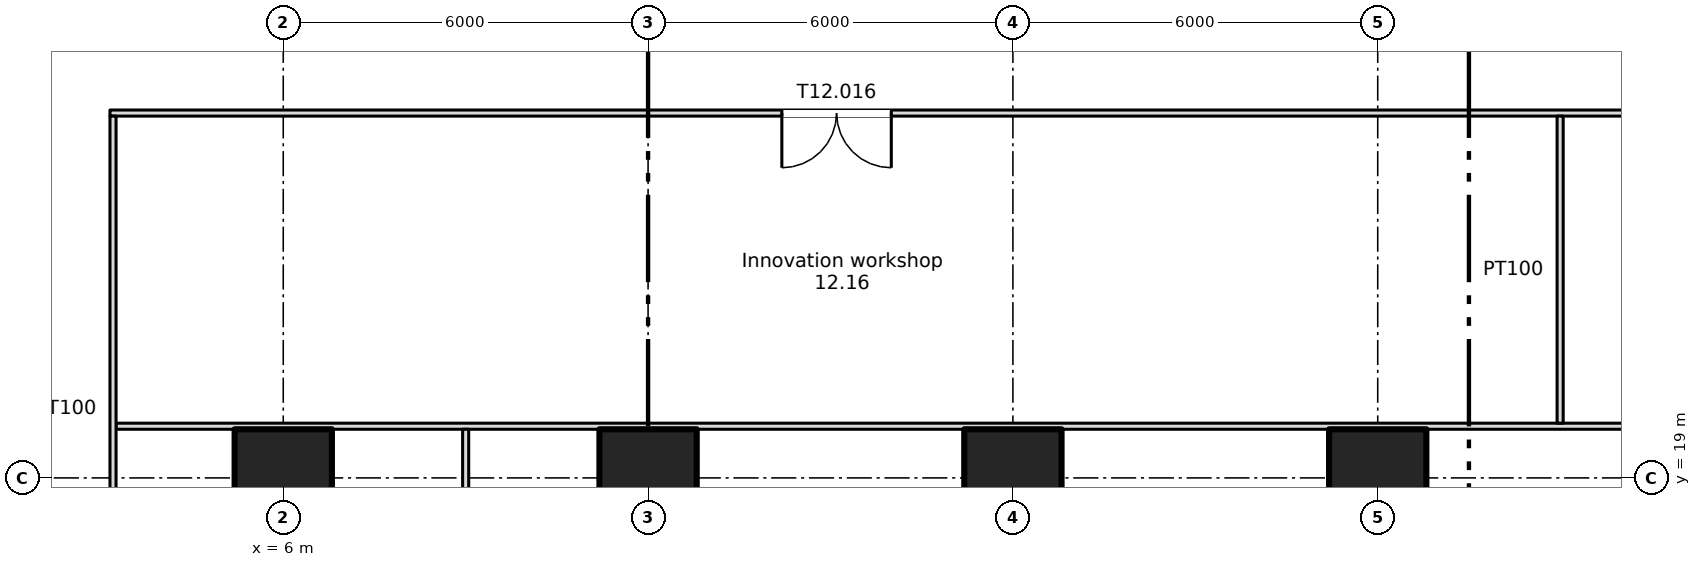
"""IFC4 building model, lengths in metres.
Left out: names, types, materials, properties, quantities, classifications, styles, units other than length and angle.
Written with IfcOpenShell. Run it as: python <this file> out.ifc"""

import sys

from ifc_helpers import new_model, si_unit, direction, frame, frame_2d, origin, origin_2d, place, context, subcontext, project, spatial, rectangle, extrude, element, fill, save


model = new_model("IFC4")
c1 = context("Model", 3, precision=1e-05, world=origin(), true_north=direction((0.0, 1.0)))
c2 = subcontext(c1, "Body", "Model", "MODEL_VIEW")
j1 = project(units=[si_unit("LENGTHUNIT", "METRE"), si_unit("PLANEANGLEUNIT", "RADIAN")], contexts=[c1])
p1 = place(None, origin())
s1 = spatial("IfcSite", under=j1, at=p1, CompositionType="ELEMENT")
p2 = place(p1, origin())
s2 = spatial("IfcBuilding", under=s1, at=p2, CompositionType="ELEMENT")
p3 = place(p2, frame((0.0, 0.0, 63.75)))
s3 = spatial("IfcBuildingStorey", under=s2, at=p3, CompositionType="ELEMENT", Elevation=63.75)
for number, where, z_axis, x_axis in (
    (1, (6.0, 19.0, 0.0), (0.0, 0.0, 1.0), (1.0, 0.0, 0.0)),
    (2, (12.0, 19.0, 0.0), (0.0, 0.0, 1.0), (1.0, 0.0, 0.0)),
    (3, (18.0, 19.0, 0.0), (0.0, 0.0, 1.0), (1.0, 0.0, 0.0)),
    (4, (24.0, 19.0, 0.0), (0.0, 0.0, 1.0), (1.0, 0.0, 0.0)),
):
    element("IfcColumn", number, at=place(p3, frame(where, z_axis=z_axis, x_axis=x_axis)), inside=s3, PredefinedType="COLUMN", context=c2, shape_type="SweptSolid", body=[
        extrude(rectangle(XDim=1.6, YDim=1.6, at=origin_2d()), origin(), (0.0, 0.0, 1.0), 3.35),
    ])
p4 = place(p3, frame((3.25, 19.85, 0.0), z_axis=(0.0, 0.0, 1.0), x_axis=(1.0, 0.0, 0.0)))
e5 = element("IfcWall", 5, at=p4, inside=s3, PredefinedType="PARTITIONING", context=c2, shape_type="SweptSolid", body=[
    extrude(rectangle(XDim=71.5, YDim=0.1, at=frame_2d((35.75, 0.0))), origin(), (0.0, 0.0, 1.0), 3.35),
])
p5 = place(p3, frame((3.15, 25.0, 0.0), z_axis=(0.0, 0.0, 1.0), x_axis=(1.0, 0.0, 0.0)))
e6 = element("IfcWall", 6, at=p5, inside=s3, PredefinedType="PARTITIONING", context=c2, shape_type="SweptSolid", body=[
    extrude(rectangle(XDim=71.7, YDim=0.1, at=frame_2d((35.85, 0.0))), origin(), (0.0, 0.0, 1.0), 3.35),
])
p6 = place(p5, frame((11.05, 0.0, 0.0)))
e7 = element("IfcOpeningElement", 7, at=p6, cuts=e6, PredefinedType="OPENING", context=c2, shape_type="SweptSolid", body=[
    extrude(rectangle(XDim=1.8, YDim=2.1, at=frame_2d((0.9, 1.05))), frame((0.0, 0.06, 0.0), z_axis=(0.0, -1.0, 0.0), x_axis=(1.0, 0.0, 0.0)), (0.0, 0.0, 1.0), 0.12),
])
p7 = place(p5, frame((35.2, 0.0, 0.0)))
e8 = element("IfcOpeningElement", 8, at=p7, cuts=e6, PredefinedType="OPENING", context=c2, shape_type="SweptSolid", body=[
    extrude(rectangle(XDim=1.2, YDim=2.1, at=frame_2d((0.6, 1.05))), frame((0.0, 0.06, 0.0), z_axis=(0.0, -1.0, 0.0), x_axis=(1.0, 0.0, 0.0)), (0.0, 0.0, 1.0), 0.12),
])
p8 = place(p5, frame((59.1, 0.0, 0.0)))
e9 = element("IfcOpeningElement", 9, at=p8, cuts=e6, PredefinedType="OPENING", context=c2, shape_type="SweptSolid", body=[
    extrude(rectangle(XDim=1.2, YDim=2.1, at=frame_2d((0.6, 1.05))), frame((0.0, 0.06, 0.0), z_axis=(0.0, -1.0, 0.0), x_axis=(1.0, 0.0, 0.0)), (0.0, 0.0, 1.0), 0.12),
])
p9 = place(p3, frame((3.2, 13.4, 0.0), z_axis=(0.0, 0.0, 1.0), x_axis=(0.0, 1.0, 0.0)))
e10 = element("IfcWall", 10, at=p9, inside=s3, PredefinedType="PARTITIONING", context=c2, shape_type="SweptSolid", body=[
    extrude(rectangle(XDim=11.55, YDim=0.1, at=frame_2d((5.775, 0.0))), origin(), (0.0, 0.0, 1.0), 3.35),
])
p10 = place(p9, frame((2.7, 0.0, 0.0)))
e11 = element("IfcOpeningElement", 11, at=p10, cuts=e10, PredefinedType="OPENING", context=c2, shape_type="SweptSolid", body=[
    extrude(rectangle(XDim=1.0, YDim=2.1, at=frame_2d((0.5, 1.05))), frame((0.0, 0.06, 0.0), z_axis=(0.0, -1.0, 0.0), x_axis=(1.0, 0.0, 0.0)), (0.0, 0.0, 1.0), 0.12),
])
p11 = place(p3, frame((9.0, 13.4, 0.0), z_axis=(0.0, 0.0, 1.0), x_axis=(0.0, 1.0, 0.0)))
e12 = element("IfcWall", 12, at=p11, inside=s3, PredefinedType="PARTITIONING", context=c2, shape_type="SweptSolid", body=[
    extrude(rectangle(XDim=6.4, YDim=0.1, at=frame_2d((3.2, 0.0))), origin(), (0.0, 0.0, 1.0), 3.35),
])
p12 = place(p3, frame((27.0, 19.9, 0.0), z_axis=(0.0, 0.0, 1.0), x_axis=(0.0, 1.0, 0.0)))
e13 = element("IfcWall", 13, at=p12, inside=s3, PredefinedType="PARTITIONING", context=c2, shape_type="SweptSolid", body=[
    extrude(rectangle(XDim=5.05, YDim=0.1, at=frame_2d((2.525, 0.0))), origin(), (0.0, 0.0, 1.0), 3.35),
])
p13 = place(p6, origin())
e14 = element("IfcDoor", 14, at=p13, inside=s3, OperationType="DOUBLE_DOOR_SINGLE_SWING", PredefinedType="DOOR", context=c2, shape_type="SweptSolid", body=[
    extrude(rectangle(XDim=1.8, YDim=2.1, at=frame_2d((0.9, 1.05))), frame((0.0, 0.025, 0.0), z_axis=(0.0, -1.0, 0.0), x_axis=(1.0, 0.0, 0.0)), (0.0, 0.0, 1.0), 0.05),
])
fill(e7, e14)
save(model, sys.argv[1])
